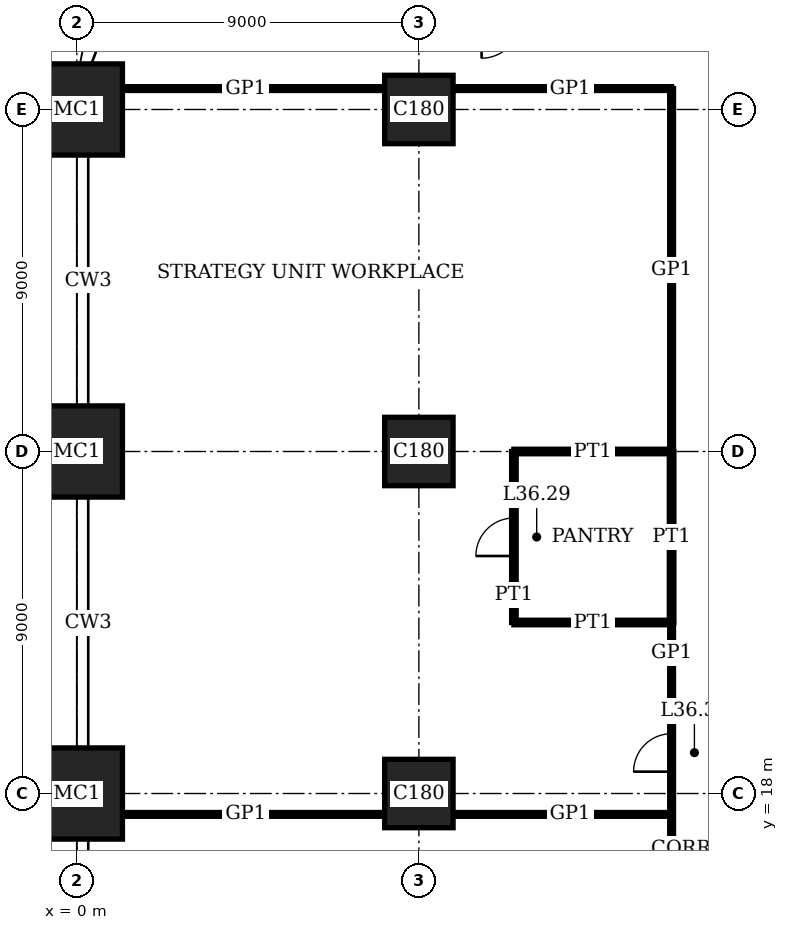
"""IFC4 building model, lengths in metres.
Left out: names, types, materials, properties, quantities, classifications, styles, units other than length and angle.
Written with IfcOpenShell. Run it as: python <this file> out.ifc"""

import sys

from ifc_helpers import new_model, si_unit, direction, frame, frame_2d, origin, origin_2d, place, context, subcontext, project, spatial, rectangle, extrude, element, fill, save


model = new_model("IFC4")
c1 = context("Model", 3, precision=1e-05, world=origin(), true_north=direction((0.0, 1.0)))
c2 = subcontext(c1, "Body", "Model", "MODEL_VIEW")
j1 = project(units=[si_unit("LENGTHUNIT", "METRE"), si_unit("PLANEANGLEUNIT", "RADIAN")], contexts=[c1])
p1 = place(None, origin())
s1 = spatial("IfcSite", under=j1, at=p1, CompositionType="ELEMENT")
p2 = place(p1, origin())
s2 = spatial("IfcBuilding", under=s1, at=p2, CompositionType="ELEMENT")
p3 = place(p2, frame((0.0, 0.0, 149.0)))
s3 = spatial("IfcBuildingStorey", under=s2, at=p3, CompositionType="ELEMENT", Elevation=149.0)
for number, where, z_axis, x_axis in (
    (1, (0.0, 18.0, 0.0), (0.0, 0.0, 1.0), (1.0, 0.0, 0.0)),
    (2, (0.0, 27.0, 0.0), (0.0, 0.0, 1.0), (1.0, 0.0, 0.0)),
    (3, (0.0, 36.0, 0.0), (0.0, 0.0, 1.0), (1.0, 0.0, 0.0)),
):
    element("IfcColumn", number, at=place(p3, frame(where, z_axis=z_axis, x_axis=x_axis)), inside=s3, PredefinedType="COLUMN", context=c2, shape_type="SweptSolid", body=[
        extrude(rectangle(XDim=2.4, YDim=2.4, at=origin_2d()), origin(), (0.0, 0.0, 1.0), 4.0),
    ])
for number, where, z_axis, x_axis in (
    (4, (9.0, 18.0, 0.0), (0.0, 0.0, 1.0), (1.0, 0.0, 0.0)),
    (5, (9.0, 27.0, 0.0), (0.0, 0.0, 1.0), (1.0, 0.0, 0.0)),
    (6, (9.0, 36.0, 0.0), (0.0, 0.0, 1.0), (1.0, 0.0, 0.0)),
):
    element("IfcColumn", number, at=place(p3, frame(where, z_axis=z_axis, x_axis=x_axis)), inside=s3, PredefinedType="COLUMN", context=c2, shape_type="SweptSolid", body=[
        extrude(rectangle(XDim=1.8, YDim=1.8, at=origin_2d()), origin(), (0.0, 0.0, 1.0), 4.0),
    ])
p4 = place(p3, frame((1.2, 17.45, 0.0), z_axis=(0.0, 0.0, 1.0), x_axis=(1.0, 0.0, 0.0)))
e7 = element("IfcWall", 7, at=p4, inside=s3, PredefinedType="PARTITIONING", context=c2, shape_type="SweptSolid", body=[
    extrude(rectangle(XDim=6.9, YDim=0.1, at=frame_2d((3.45, 0.0))), origin(), (0.0, 0.0, 1.0), 3.05),
])
p5 = place(p3, frame((9.9, 17.45, 0.0), z_axis=(0.0, 0.0, 1.0), x_axis=(1.0, 0.0, 0.0)))
e8 = element("IfcWall", 8, at=p5, inside=s3, PredefinedType="PARTITIONING", context=c2, shape_type="SweptSolid", body=[
    extrude(rectangle(XDim=5.75, YDim=0.1, at=frame_2d((2.875, 0.0))), origin(), (0.0, 0.0, 1.0), 3.05),
])
p6 = place(p3, frame((11.5, 22.5, 0.0), z_axis=(0.0, 0.0, 1.0), x_axis=(1.0, 0.0, 0.0)))
e9 = element("IfcWall", 9, at=p6, inside=s3, PredefinedType="PARTITIONING", context=c2, shape_type="SweptSolid", body=[
    extrude(rectangle(XDim=4.15, YDim=0.12, at=frame_2d((2.075, 0.0))), origin(), (0.0, 0.0, 1.0), 3.1),
])
p7 = place(p3, frame((11.5, 27.0, 0.0), z_axis=(0.0, 0.0, 1.0), x_axis=(1.0, 0.0, 0.0)))
e10 = element("IfcWall", 10, at=p7, inside=s3, PredefinedType="PARTITIONING", context=c2, shape_type="SweptSolid", body=[
    extrude(rectangle(XDim=4.15, YDim=0.12, at=frame_2d((2.075, 0.0))), origin(), (0.0, 0.0, 1.0), 3.05),
])
p8 = place(p3, frame((1.2, 36.55, 0.0), z_axis=(0.0, 0.0, 1.0), x_axis=(1.0, 0.0, 0.0)))
e11 = element("IfcWall", 11, at=p8, inside=s3, PredefinedType="PARTITIONING", context=c2, shape_type="SweptSolid", body=[
    extrude(rectangle(XDim=6.9, YDim=0.1, at=frame_2d((3.45, 0.0))), origin(), (0.0, 0.0, 1.0), 3.05),
])
p9 = place(p3, frame((9.9, 36.55, 0.0), z_axis=(0.0, 0.0, 1.0), x_axis=(1.0, 0.0, 0.0)))
e12 = element("IfcWall", 12, at=p9, inside=s3, PredefinedType="PARTITIONING", context=c2, shape_type="SweptSolid", body=[
    extrude(rectangle(XDim=5.75, YDim=0.1, at=frame_2d((2.875, 0.0))), origin(), (0.0, 0.0, 1.0), 3.05),
])
p10 = place(p3, frame((11.5, 22.5, 0.0), z_axis=(0.0, 0.0, 1.0), x_axis=(0.0, 1.0, 0.0)))
e13 = element("IfcWall", 13, at=p10, inside=s3, PredefinedType="PARTITIONING", context=c2, shape_type="SweptSolid", body=[
    extrude(rectangle(XDim=4.5, YDim=0.12, at=frame_2d((2.25, 0.0))), origin(), (0.0, 0.0, 1.0), 3.75),
])
p11 = place(p10, frame((1.75, 0.0, 0.0)))
e14 = element("IfcOpeningElement", 14, at=p11, cuts=e13, PredefinedType="OPENING", context=c2, shape_type="SweptSolid", body=[
    extrude(rectangle(XDim=1.0, YDim=2.4, at=frame_2d((0.5, 1.2))), frame((0.0, 0.07, 0.0), z_axis=(0.0, -1.0, 0.0), x_axis=(1.0, 0.0, 0.0)), (0.0, 0.0, 1.0), 0.14),
])
p12 = place(p3, frame((15.65, 22.5, 0.0), z_axis=(0.0, 0.0, 1.0), x_axis=(0.0, 1.0, 0.0)))
e15 = element("IfcWall", 15, at=p12, inside=s3, PredefinedType="PARTITIONING", context=c2, shape_type="SweptSolid", body=[
    extrude(rectangle(XDim=4.5, YDim=0.12, at=frame_2d((2.25, 0.0))), origin(), (0.0, 0.0, 1.0), 3.75),
])
p13 = place(p3, frame((15.65, 15.65, 0.0), z_axis=(0.0, 0.0, 1.0), x_axis=(0.0, 1.0, 0.0)))
e16 = element("IfcWall", 16, at=p13, inside=s3, PredefinedType="PARTITIONING", context=c2, shape_type="SweptSolid", body=[
    extrude(rectangle(XDim=6.85, YDim=0.1, at=frame_2d((3.425, 0.0))), origin(), (0.0, 0.0, 1.0), 3.75),
])
p14 = place(p13, frame((2.925, 0.0, 0.0)))
e17 = element("IfcOpeningElement", 17, at=p14, cuts=e16, PredefinedType="OPENING", context=c2, shape_type="SweptSolid", body=[
    extrude(rectangle(XDim=1.0, YDim=2.4, at=frame_2d((0.5, 1.2))), frame((0.0, 0.06, 0.0), z_axis=(0.0, -1.0, 0.0), x_axis=(1.0, 0.0, 0.0)), (0.0, 0.0, 1.0), 0.12),
])
p15 = place(p3, frame((15.65, 27.0, 0.0), z_axis=(0.0, 0.0, 1.0), x_axis=(0.0, 1.0, 0.0)))
e18 = element("IfcWall", 18, at=p15, inside=s3, PredefinedType="PARTITIONING", context=c2, shape_type="SweptSolid", body=[
    extrude(rectangle(XDim=9.55, YDim=0.1, at=frame_2d((4.775, 0.0))), origin(), (0.0, 0.0, 1.0), 3.75),
])
p16 = place(p11, origin())
e19 = element("IfcDoor", 19, at=p16, inside=s3, OperationType="SINGLE_SWING_RIGHT", PredefinedType="DOOR", context=c2, shape_type="SweptSolid", body=[
    extrude(rectangle(XDim=1.0, YDim=2.4, at=frame_2d((0.5, 1.2))), frame((0.0, 0.025, 0.0), z_axis=(0.0, -1.0, 0.0), x_axis=(1.0, 0.0, 0.0)), (0.0, 0.0, 1.0), 0.05),
])
fill(e14, e19)
p17 = place(p14, origin())
e20 = element("IfcDoor", 20, at=p17, inside=s3, OperationType="SINGLE_SWING_RIGHT", PredefinedType="DOOR", context=c2, shape_type="SweptSolid", body=[
    extrude(rectangle(XDim=1.0, YDim=2.4, at=frame_2d((0.5, 1.2))), frame((0.0, 0.02, 0.0), z_axis=(0.0, -1.0, 0.0), x_axis=(1.0, 0.0, 0.0)), (0.0, 0.0, 1.0), 0.04),
])
fill(e17, e20)
save(model, sys.argv[1])
